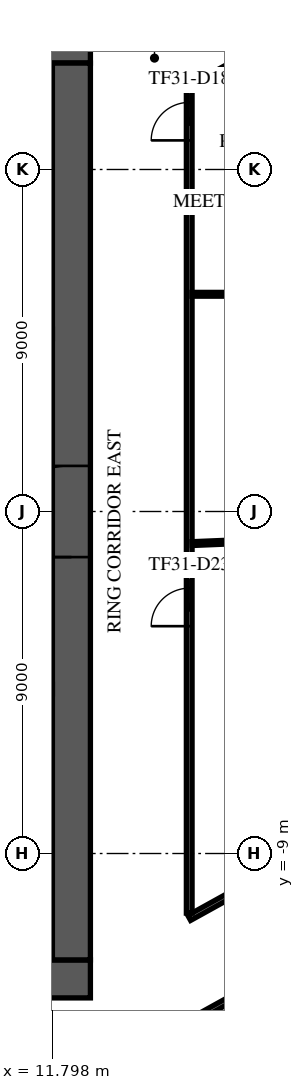
"""IFC4 building model, lengths in metres.
Left out: names, types, materials, properties, quantities, classifications, styles, units other than length and angle.
Written with IfcOpenShell. Run it as: python <this file> out.ifc"""

import sys

from ifc_helpers import new_model, si_unit, direction, frame, frame_2d, origin, place, context, subcontext, project, spatial, rectangle, extrude, element, fill, save


model = new_model("IFC4")
c1 = context("Model", 3, precision=1e-05, world=origin(), true_north=direction((0.0, 1.0)))
c2 = subcontext(c1, "Body", "Model", "MODEL_VIEW")
j1 = project(units=[si_unit("LENGTHUNIT", "METRE"), si_unit("PLANEANGLEUNIT", "RADIAN")], contexts=[c1])
p1 = place(None, origin())
s1 = spatial("IfcSite", under=j1, at=p1, CompositionType="ELEMENT")
p2 = place(p1, origin())
s2 = spatial("IfcBuilding", under=s1, at=p2, CompositionType="ELEMENT")
p3 = place(p2, frame((0.0, 0.0, 135.7)))
s3 = spatial("IfcBuildingStorey", under=s2, at=p3, CompositionType="ELEMENT", Elevation=135.7)
p4 = place(p3, frame((-12.8, 12.3, 0.0), z_axis=(0.0, 0.0, 1.0), x_axis=(1.0, 0.0, 0.0)))
e1 = element("IfcWall", 1, at=p4, inside=s3, PredefinedType="SHEAR", context=c2, shape_type="SweptSolid", body=[
    extrude(rectangle(XDim=25.6, YDim=1.0, at=frame_2d((12.8, 0.0))), origin(), (0.0, 0.0, 1.0), 3.6),
])
p5 = place(p4, frame((11.6, 0.0, 0.0)))
e2 = element("IfcOpeningElement", 2, at=p5, cuts=e1, PredefinedType="OPENING", context=c2, shape_type="SweptSolid", body=[
    extrude(rectangle(XDim=2.4, YDim=2.4, at=frame_2d((1.2, 1.2))), frame((0.0, 0.51, 0.0), z_axis=(0.0, -1.0, 0.0), x_axis=(1.0, 0.0, 0.0)), (0.0, 0.0, 1.0), 1.02),
])
p6 = place(p4, frame((22.425, 0.0, 0.0)))
e3 = element("IfcOpeningElement", 3, at=p6, cuts=e1, PredefinedType="OPENING", context=c2, shape_type="SweptSolid", body=[
    extrude(rectangle(XDim=1.2, YDim=2.1, at=frame_2d((0.6, 1.05))), frame((0.0, 0.51, 0.0), z_axis=(0.0, -1.0, 0.0), x_axis=(1.0, 0.0, 0.0)), (0.0, 0.0, 1.0), 1.02),
])
p7 = place(p4, frame((1.4, 0.0, 0.0)))
e4 = element("IfcOpeningElement", 4, at=p7, cuts=e1, PredefinedType="OPENING", context=c2, shape_type="SweptSolid", body=[
    extrude(rectangle(XDim=1.0, YDim=2.1, at=frame_2d((0.5, 1.05))), frame((0.0, 0.51, 0.0), z_axis=(0.0, -1.0, 0.0), x_axis=(1.0, 0.0, 0.0)), (0.0, 0.0, 1.0), 1.02),
])
p8 = place(p3, frame((-12.8, -12.3, 0.0), z_axis=(0.0, 0.0, 1.0), x_axis=(1.0, 0.0, 0.0)))
e5 = element("IfcWall", 5, at=p8, inside=s3, PredefinedType="SHEAR", context=c2, shape_type="SweptSolid", body=[
    extrude(rectangle(XDim=25.6, YDim=1.0, at=frame_2d((12.8, 0.0))), origin(), (0.0, 0.0, 1.0), 3.6),
])
p9 = place(p8, frame((7.7, 0.0, 0.0)))
e6 = element("IfcOpeningElement", 6, at=p9, cuts=e5, PredefinedType="OPENING", context=c2, shape_type="SweptSolid", body=[
    extrude(rectangle(XDim=2.0, YDim=2.1, at=frame_2d((1.0, 1.05))), frame((0.0, 0.51, 0.0), z_axis=(0.0, -1.0, 0.0), x_axis=(1.0, 0.0, 0.0)), (0.0, 0.0, 1.0), 1.02),
])
p10 = place(p8, frame((17.825, 0.0, 0.0)))
e7 = element("IfcOpeningElement", 7, at=p10, cuts=e5, PredefinedType="OPENING", context=c2, shape_type="SweptSolid", body=[
    extrude(rectangle(XDim=1.2, YDim=2.1, at=frame_2d((0.6, 1.05))), frame((0.0, 0.51, 0.0), z_axis=(0.0, -1.0, 0.0), x_axis=(1.0, 0.0, 0.0)), (0.0, 0.0, 1.0), 1.02),
])
p11 = place(p8, frame((1.975, 0.0, 0.0)))
e8 = element("IfcOpeningElement", 8, at=p11, cuts=e5, PredefinedType="OPENING", context=c2, shape_type="SweptSolid", body=[
    extrude(rectangle(XDim=1.2, YDim=2.1, at=frame_2d((0.6, 1.05))), frame((0.0, 0.51, 0.0), z_axis=(0.0, -1.0, 0.0), x_axis=(1.0, 0.0, 0.0)), (0.0, 0.0, 1.0), 1.02),
])
p12 = place(p8, frame((22.425, 0.0, 0.0)))
e9 = element("IfcOpeningElement", 9, at=p12, cuts=e5, PredefinedType="OPENING", context=c2, shape_type="SweptSolid", body=[
    extrude(rectangle(XDim=1.2, YDim=2.1, at=frame_2d((0.6, 1.05))), frame((0.0, 0.51, 0.0), z_axis=(0.0, -1.0, 0.0), x_axis=(1.0, 0.0, 0.0)), (0.0, 0.0, 1.0), 1.02),
])
p13 = place(p3, frame((12.3, -11.8, 0.0), z_axis=(0.0, 0.0, 1.0), x_axis=(0.0, 1.0, 0.0)))
e10 = element("IfcWall", 10, at=p13, inside=s3, PredefinedType="SHEAR", context=c2, shape_type="SweptSolid", body=[
    extrude(rectangle(XDim=23.6, YDim=1.0, at=frame_2d((11.8, 0.0))), origin(), (0.0, 0.0, 1.0), 3.6),
])
p14 = place(p13, frame((10.6, 0.0, 0.0)))
e11 = element("IfcOpeningElement", 11, at=p14, cuts=e10, PredefinedType="OPENING", context=c2, shape_type="SweptSolid", body=[
    extrude(rectangle(XDim=2.4, YDim=2.4, at=frame_2d((1.2, 1.2))), frame((0.0, 0.51, 0.0), z_axis=(0.0, -1.0, 0.0), x_axis=(1.0, 0.0, 0.0)), (0.0, 0.0, 1.0), 1.02),
])
for number, where, z_axis, x_axis in (
    (12, (8.65, 4.675, 0.0), (0.0, 0.0, 1.0), (1.0, 0.0, 0.0)),
    (13, (8.65, -4.675, 0.0), (0.0, 0.0, 1.0), (1.0, 0.0, 0.0)),
):
    element("IfcWall", number, at=place(p3, frame(where, z_axis=z_axis, x_axis=x_axis)), inside=s3, PredefinedType="SOLIDWALL", context=c2, shape_type="SweptSolid", body=[
        extrude(rectangle(XDim=3.15, YDim=0.25, at=frame_2d((1.575, 0.0))), origin(), (0.0, 0.0, 1.0), 3.6),
    ])
p15 = place(p3, frame((-9.103, -34.888, 0.0), z_axis=(0.0, 0.0, 1.0), x_axis=(0.874618897425, 0.484811081007, 0.0)))
e14 = element("IfcWall", 14, at=p15, inside=s3, PredefinedType="STANDARD", context=c2, shape_type="SweptSolid", body=[
    extrude(rectangle(XDim=49.751, YDim=0.6, at=frame_2d((24.876, 0.0))), origin(), (0.0, 0.0, 1.0), 3.6),
])
p16 = place(p15, frame((1.161, 0.0, 0.9)))
e15 = element("IfcOpeningElement", 15, at=p16, cuts=e14, PredefinedType="OPENING", context=c2, shape_type="SweptSolid", body=[
    extrude(rectangle(XDim=2.1, YDim=2.1, at=frame_2d((1.05, 1.05))), frame((0.0, 0.31, 0.0), z_axis=(0.0, -1.0, 0.0), x_axis=(1.0, 0.0, 0.0)), (0.0, 0.0, 1.0), 0.62),
])
p17 = place(p15, frame((5.644, 0.0, 0.9)))
e16 = element("IfcOpeningElement", 16, at=p17, cuts=e14, PredefinedType="OPENING", context=c2, shape_type="SweptSolid", body=[
    extrude(rectangle(XDim=2.1, YDim=2.1, at=frame_2d((1.05, 1.05))), frame((0.0, 0.31, 0.0), z_axis=(0.0, -1.0, 0.0), x_axis=(1.0, 0.0, 0.0)), (0.0, 0.0, 1.0), 0.62),
])
p18 = place(p15, frame((10.189, 0.0, 0.9)))
e17 = element("IfcOpeningElement", 17, at=p18, cuts=e14, PredefinedType="OPENING", context=c2, shape_type="SweptSolid", body=[
    extrude(rectangle(XDim=2.1, YDim=2.1, at=frame_2d((1.05, 1.05))), frame((0.0, 0.31, 0.0), z_axis=(0.0, -1.0, 0.0), x_axis=(1.0, 0.0, 0.0)), (0.0, 0.0, 1.0), 0.62),
])
p19 = place(p15, frame((14.735, 0.0, 0.9)))
e18 = element("IfcOpeningElement", 18, at=p19, cuts=e14, PredefinedType="OPENING", context=c2, shape_type="SweptSolid", body=[
    extrude(rectangle(XDim=2.1, YDim=2.1, at=frame_2d((1.05, 1.05))), frame((0.0, 0.31, 0.0), z_axis=(0.0, -1.0, 0.0), x_axis=(1.0, 0.0, 0.0)), (0.0, 0.0, 1.0), 0.62),
])
p20 = place(p15, frame((19.28, 0.0, 0.9)))
e19 = element("IfcOpeningElement", 19, at=p20, cuts=e14, PredefinedType="OPENING", context=c2, shape_type="SweptSolid", body=[
    extrude(rectangle(XDim=2.1, YDim=2.1, at=frame_2d((1.05, 1.05))), frame((0.0, 0.31, 0.0), z_axis=(0.0, -1.0, 0.0), x_axis=(1.0, 0.0, 0.0)), (0.0, 0.0, 1.0), 0.62),
])
p21 = place(p15, frame((23.826, 0.0, 0.9)))
e20 = element("IfcOpeningElement", 20, at=p21, cuts=e14, PredefinedType="OPENING", context=c2, shape_type="SweptSolid", body=[
    extrude(rectangle(XDim=2.1, YDim=2.1, at=frame_2d((1.05, 1.05))), frame((0.0, 0.31, 0.0), z_axis=(0.0, -1.0, 0.0), x_axis=(1.0, 0.0, 0.0)), (0.0, 0.0, 1.0), 0.62),
])
p22 = place(p15, frame((28.371, 0.0, 0.9)))
e21 = element("IfcOpeningElement", 21, at=p22, cuts=e14, PredefinedType="OPENING", context=c2, shape_type="SweptSolid", body=[
    extrude(rectangle(XDim=2.1, YDim=2.1, at=frame_2d((1.05, 1.05))), frame((0.0, 0.31, 0.0), z_axis=(0.0, -1.0, 0.0), x_axis=(1.0, 0.0, 0.0)), (0.0, 0.0, 1.0), 0.62),
])
p23 = place(p15, frame((32.917, 0.0, 0.9)))
e22 = element("IfcOpeningElement", 22, at=p23, cuts=e14, PredefinedType="OPENING", context=c2, shape_type="SweptSolid", body=[
    extrude(rectangle(XDim=2.1, YDim=2.1, at=frame_2d((1.05, 1.05))), frame((0.0, 0.31, 0.0), z_axis=(0.0, -1.0, 0.0), x_axis=(1.0, 0.0, 0.0)), (0.0, 0.0, 1.0), 0.62),
])
p24 = place(p15, frame((37.462, 0.0, 0.9)))
e23 = element("IfcOpeningElement", 23, at=p24, cuts=e14, PredefinedType="OPENING", context=c2, shape_type="SweptSolid", body=[
    extrude(rectangle(XDim=2.1, YDim=2.1, at=frame_2d((1.05, 1.05))), frame((0.0, 0.31, 0.0), z_axis=(0.0, -1.0, 0.0), x_axis=(1.0, 0.0, 0.0)), (0.0, 0.0, 1.0), 0.62),
])
p25 = place(p15, frame((42.008, 0.0, 0.9)))
e24 = element("IfcOpeningElement", 24, at=p25, cuts=e14, PredefinedType="OPENING", context=c2, shape_type="SweptSolid", body=[
    extrude(rectangle(XDim=2.1, YDim=2.1, at=frame_2d((1.05, 1.05))), frame((0.0, 0.31, 0.0), z_axis=(0.0, -1.0, 0.0), x_axis=(1.0, 0.0, 0.0)), (0.0, 0.0, 1.0), 0.62),
])
p26 = place(p15, frame((46.491, 0.0, 0.9)))
e25 = element("IfcOpeningElement", 25, at=p26, cuts=e14, PredefinedType="OPENING", context=c2, shape_type="SweptSolid", body=[
    extrude(rectangle(XDim=2.1, YDim=2.1, at=frame_2d((1.05, 1.05))), frame((0.0, 0.31, 0.0), z_axis=(0.0, -1.0, 0.0), x_axis=(1.0, 0.0, 0.0)), (0.0, 0.0, 1.0), 0.62),
])
p27 = place(p3, frame((36.291, -4.209, 0.0), z_axis=(0.0, 0.0, 1.0), x_axis=(-0.484811111615, 0.874618880458, 0.0)))
e26 = element("IfcWall", 26, at=p27, inside=s3, PredefinedType="STANDARD", context=c2, shape_type="SweptSolid", body=[
    extrude(rectangle(XDim=42.176, YDim=0.6, at=frame_2d((21.088, 0.0))), origin(), (0.0, 0.0, 1.0), 3.6),
])
p28 = place(p27, frame((1.138, 0.0, 0.9)))
e27 = element("IfcOpeningElement", 27, at=p28, cuts=e26, PredefinedType="OPENING", context=c2, shape_type="SweptSolid", body=[
    extrude(rectangle(XDim=2.3, YDim=2.1, at=frame_2d((1.15, 1.05))), frame((0.0, 0.31, 0.0), z_axis=(0.0, -1.0, 0.0), x_axis=(1.0, 0.0, 0.0)), (0.0, 0.0, 1.0), 0.62),
])
p29 = place(p27, frame((5.776, 0.0, 0.9)))
e28 = element("IfcOpeningElement", 28, at=p29, cuts=e26, PredefinedType="OPENING", context=c2, shape_type="SweptSolid", body=[
    extrude(rectangle(XDim=2.3, YDim=2.1, at=frame_2d((1.15, 1.05))), frame((0.0, 0.31, 0.0), z_axis=(0.0, -1.0, 0.0), x_axis=(1.0, 0.0, 0.0)), (0.0, 0.0, 1.0), 0.62),
])
p30 = place(p27, frame((15.176, 0.0, 0.9)))
e29 = element("IfcOpeningElement", 29, at=p30, cuts=e26, PredefinedType="OPENING", context=c2, shape_type="SweptSolid", body=[
    extrude(rectangle(XDim=2.3, YDim=2.1, at=frame_2d((1.15, 1.05))), frame((0.0, 0.31, 0.0), z_axis=(0.0, -1.0, 0.0), x_axis=(1.0, 0.0, 0.0)), (0.0, 0.0, 1.0), 0.62),
])
p31 = place(p27, frame((19.876, 0.0, 0.9)))
e30 = element("IfcOpeningElement", 30, at=p31, cuts=e26, PredefinedType="OPENING", context=c2, shape_type="SweptSolid", body=[
    extrude(rectangle(XDim=2.3, YDim=2.1, at=frame_2d((1.15, 1.05))), frame((0.0, 0.31, 0.0), z_axis=(0.0, -1.0, 0.0), x_axis=(1.0, 0.0, 0.0)), (0.0, 0.0, 1.0), 0.62),
])
p32 = place(p27, frame((24.576, 0.0, 0.9)))
e31 = element("IfcOpeningElement", 31, at=p32, cuts=e26, PredefinedType="OPENING", context=c2, shape_type="SweptSolid", body=[
    extrude(rectangle(XDim=2.3, YDim=2.1, at=frame_2d((1.15, 1.05))), frame((0.0, 0.31, 0.0), z_axis=(0.0, -1.0, 0.0), x_axis=(1.0, 0.0, 0.0)), (0.0, 0.0, 1.0), 0.62),
])
p33 = place(p27, frame((29.276, 0.0, 0.9)))
e32 = element("IfcOpeningElement", 32, at=p33, cuts=e26, PredefinedType="OPENING", context=c2, shape_type="SweptSolid", body=[
    extrude(rectangle(XDim=2.3, YDim=2.1, at=frame_2d((1.15, 1.05))), frame((0.0, 0.31, 0.0), z_axis=(0.0, -1.0, 0.0), x_axis=(1.0, 0.0, 0.0)), (0.0, 0.0, 1.0), 0.62),
])
p34 = place(p27, frame((33.976, 0.0, 0.9)))
e33 = element("IfcOpeningElement", 33, at=p34, cuts=e26, PredefinedType="OPENING", context=c2, shape_type="SweptSolid", body=[
    extrude(rectangle(XDim=2.3, YDim=2.1, at=frame_2d((1.15, 1.05))), frame((0.0, 0.31, 0.0), z_axis=(0.0, -1.0, 0.0), x_axis=(1.0, 0.0, 0.0)), (0.0, 0.0, 1.0), 0.62),
])
p35 = place(p27, frame((38.676, 0.0, 0.9)))
e34 = element("IfcOpeningElement", 34, at=p35, cuts=e26, PredefinedType="OPENING", context=c2, shape_type="SweptSolid", body=[
    extrude(rectangle(XDim=2.3, YDim=2.1, at=frame_2d((1.15, 1.05))), frame((0.0, 0.31, 0.0), z_axis=(0.0, -1.0, 0.0), x_axis=(1.0, 0.0, 0.0)), (0.0, 0.0, 1.0), 0.62),
])
p36 = place(p3, frame((-4.484, -24.462, 0.0), z_axis=(0.0, 0.0, 1.0), x_axis=(0.874618059696, 0.484812592301, 0.0)))
e35 = element("IfcWall", 35, at=p36, inside=s3, PredefinedType="PARTITIONING", context=c2, shape_type="SweptSolid", body=[
    extrude(rectangle(XDim=31.638, YDim=0.15, at=frame_2d((15.819, 0.0))), origin(), (0.0, 0.0, 1.0), 3.15),
])
p37 = place(p36, frame((9.25, 0.0, 0.0)))
e36 = element("IfcOpeningElement", 36, at=p37, cuts=e35, PredefinedType="OPENING", context=c2, shape_type="SweptSolid", body=[
    extrude(rectangle(XDim=1.0, YDim=2.1, at=frame_2d((0.5, 1.05))), frame((0.0, 0.085, 0.0), z_axis=(0.0, -1.0, 0.0), x_axis=(1.0, 0.0, 0.0)), (0.0, 0.0, 1.0), 0.17),
])
p38 = place(p36, frame((19.239, 0.0, 0.0)))
e37 = element("IfcOpeningElement", 37, at=p38, cuts=e35, PredefinedType="OPENING", context=c2, shape_type="SweptSolid", body=[
    extrude(rectangle(XDim=1.0, YDim=2.1, at=frame_2d((0.5, 1.05))), frame((0.0, 0.085, 0.0), z_axis=(0.0, -1.0, 0.0), x_axis=(1.0, 0.0, 0.0)), (0.0, 0.0, 1.0), 0.17),
])
p39 = place(p36, frame((24.772, 0.0, 0.0)))
e38 = element("IfcOpeningElement", 38, at=p39, cuts=e35, PredefinedType="OPENING", context=c2, shape_type="SweptSolid", body=[
    extrude(rectangle(XDim=1.0, YDim=2.1, at=frame_2d((0.5, 1.05))), frame((0.0, 0.085, 0.0), z_axis=(0.0, -1.0, 0.0), x_axis=(1.0, 0.0, 0.0)), (0.0, 0.0, 1.0), 0.17),
])
p40 = place(p3, frame((14.639, 20.66, 0.0), z_axis=(0.0, 0.0, 1.0), x_axis=(0.484803020703, -0.874623365294, 0.0)))
e39 = element("IfcWall", 39, at=p40, inside=s3, PredefinedType="PARTITIONING", context=c2, shape_type="SweptSolid", body=[
    extrude(rectangle(XDim=22.02, YDim=0.15, at=frame_2d((11.01, 0.0))), origin(), (0.0, 0.0, 1.0), 3.15),
])
p41 = place(p40, frame((10.083, 0.0, 0.0)))
e40 = element("IfcOpeningElement", 40, at=p41, cuts=e39, PredefinedType="OPENING", context=c2, shape_type="SweptSolid", body=[
    extrude(rectangle(XDim=1.0, YDim=2.1, at=frame_2d((0.5, 1.05))), frame((0.0, 0.085, 0.0), z_axis=(0.0, -1.0, 0.0), x_axis=(1.0, 0.0, 0.0)), (0.0, 0.0, 1.0), 0.17),
])
p42 = place(p3, frame((15.4, -10.695, 0.0), z_axis=(0.0, 0.0, 1.0), x_axis=(0.874623752953, 0.484802321334, 0.0)))
e41 = element("IfcWall", 41, at=p42, inside=s3, PredefinedType="PARTITIONING", context=c2, shape_type="SweptSolid", body=[
    extrude(rectangle(XDim=7.573, YDim=0.15, at=frame_2d((3.786, 0.0))), origin(), (0.0, 0.0, 1.0), 3.15),
])
p43 = place(p42, frame((2.55, 0.0, 0.0)))
e42 = element("IfcOpeningElement", 42, at=p43, cuts=e41, PredefinedType="OPENING", context=c2, shape_type="SweptSolid", body=[
    extrude(rectangle(XDim=1.8, YDim=2.1, at=frame_2d((0.9, 1.05))), frame((0.0, 0.085, 0.0), z_axis=(0.0, -1.0, 0.0), x_axis=(1.0, 0.0, 0.0)), (0.0, 0.0, 1.0), 0.17),
])
p44 = place(p3, frame((15.4, -10.568, 0.0), z_axis=(0.0, 0.0, 1.0), x_axis=(0.0, 1.0, 0.0)))
e43 = element("IfcWall", 43, at=p44, inside=s3, PredefinedType="PARTITIONING", context=c2, shape_type="SweptSolid", body=[
    extrude(rectangle(XDim=21.695, YDim=0.15, at=frame_2d((10.847, 0.0))), origin(), (0.0, 0.0, 1.0), 3.15),
])
p45 = place(p44, frame((20.333, 0.0, 0.0)))
e44 = element("IfcOpeningElement", 44, at=p45, cuts=e43, PredefinedType="OPENING", context=c2, shape_type="SweptSolid", body=[
    extrude(rectangle(XDim=1.0, YDim=2.1, at=frame_2d((0.5, 1.05))), frame((0.0, 0.085, 0.0), z_axis=(0.0, -1.0, 0.0), x_axis=(1.0, 0.0, 0.0)), (0.0, 0.0, 1.0), 0.17),
])
p46 = place(p44, frame((7.55, 0.0, 0.0)))
e45 = element("IfcOpeningElement", 45, at=p46, cuts=e43, PredefinedType="OPENING", context=c2, shape_type="SweptSolid", body=[
    extrude(rectangle(XDim=1.0, YDim=2.1, at=frame_2d((0.5, 1.05))), frame((0.0, 0.085, 0.0), z_axis=(0.0, -1.0, 0.0), x_axis=(1.0, 0.0, 0.0)), (0.0, 0.0, 1.0), 0.17),
])
p47 = place(p3, frame((15.511, 11.189, 0.0), z_axis=(0.0, 0.0, 1.0), x_axis=(0.874559677803, 0.484917900227, 0.0)))
e46 = element("IfcWall", 46, at=p47, inside=s3, PredefinedType="PARTITIONING", context=c2, shape_type="SweptSolid", body=[
    extrude(rectangle(XDim=1.43, YDim=0.15, at=frame_2d((0.715, 0.0))), origin(), (0.0, 0.0, 1.0), 3.6),
])
p48 = place(p3, frame((15.475, 5.716, 0.0), z_axis=(0.0, 0.0, 1.0), x_axis=(1.0, 0.0, 0.0)))
e47 = element("IfcWall", 47, at=p48, inside=s3, PredefinedType="PARTITIONING", context=c2, shape_type="SweptSolid", body=[
    extrude(rectangle(XDim=4.59, YDim=0.1, at=frame_2d((2.295, 0.0))), origin(), (0.0, 0.0, 1.0), 3.03),
])
p49 = place(p3, frame((15.477, -0.845, 0.0), z_axis=(0.0, 0.0, 1.0), x_axis=(0.999139523849, 0.041475437099, 0.0)))
e48 = element("IfcWall", 48, at=p49, inside=s3, PredefinedType="PARTITIONING", context=c2, shape_type="SweptSolid", body=[
    extrude(rectangle(XDim=18.201, YDim=0.1, at=frame_2d((9.1, 0.0))), origin(), (0.0, 0.0, 1.0), 3.6),
])
p50 = place(p14, origin())
e49 = element("IfcDoor", 49, at=p50, inside=s3, OperationType="SINGLE_SWING_LEFT", PredefinedType="DOOR", context=c2, shape_type="SweptSolid", body=[
    extrude(rectangle(XDim=2.4, YDim=2.4, at=frame_2d((1.2, 1.2))), frame((0.0, 0.025, 0.0), z_axis=(0.0, -1.0, 0.0), x_axis=(1.0, 0.0, 0.0)), (0.0, 0.0, 1.0), 0.05),
])
fill(e11, e49)
p51 = place(p45, frame((1.0, 0.0, 0.0), z_axis=(0.0, 0.0, 1.0), x_axis=(-1.0, 0.0, 0.0)))
e50 = element("IfcDoor", 50, at=p51, inside=s3, OperationType="SINGLE_SWING_LEFT", PredefinedType="DOOR", context=c2, shape_type="SweptSolid", body=[
    extrude(rectangle(XDim=1.0, YDim=2.1, at=frame_2d((0.5, 1.05))), frame((0.0, 0.025, 0.0), z_axis=(0.0, -1.0, 0.0), x_axis=(1.0, 0.0, 0.0)), (0.0, 0.0, 1.0), 0.05),
])
fill(e44, e50)
p52 = place(p46, frame((1.0, 0.0, 0.0), z_axis=(0.0, 0.0, 1.0), x_axis=(-1.0, 0.0, 0.0)))
e51 = element("IfcDoor", 51, at=p52, inside=s3, OperationType="SINGLE_SWING_RIGHT", PredefinedType="DOOR", context=c2, shape_type="SweptSolid", body=[
    extrude(rectangle(XDim=1.0, YDim=2.1, at=frame_2d((0.5, 1.05))), frame((0.0, 0.025, 0.0), z_axis=(0.0, -1.0, 0.0), x_axis=(1.0, 0.0, 0.0)), (0.0, 0.0, 1.0), 0.05),
])
fill(e45, e51)
save(model, sys.argv[1])
